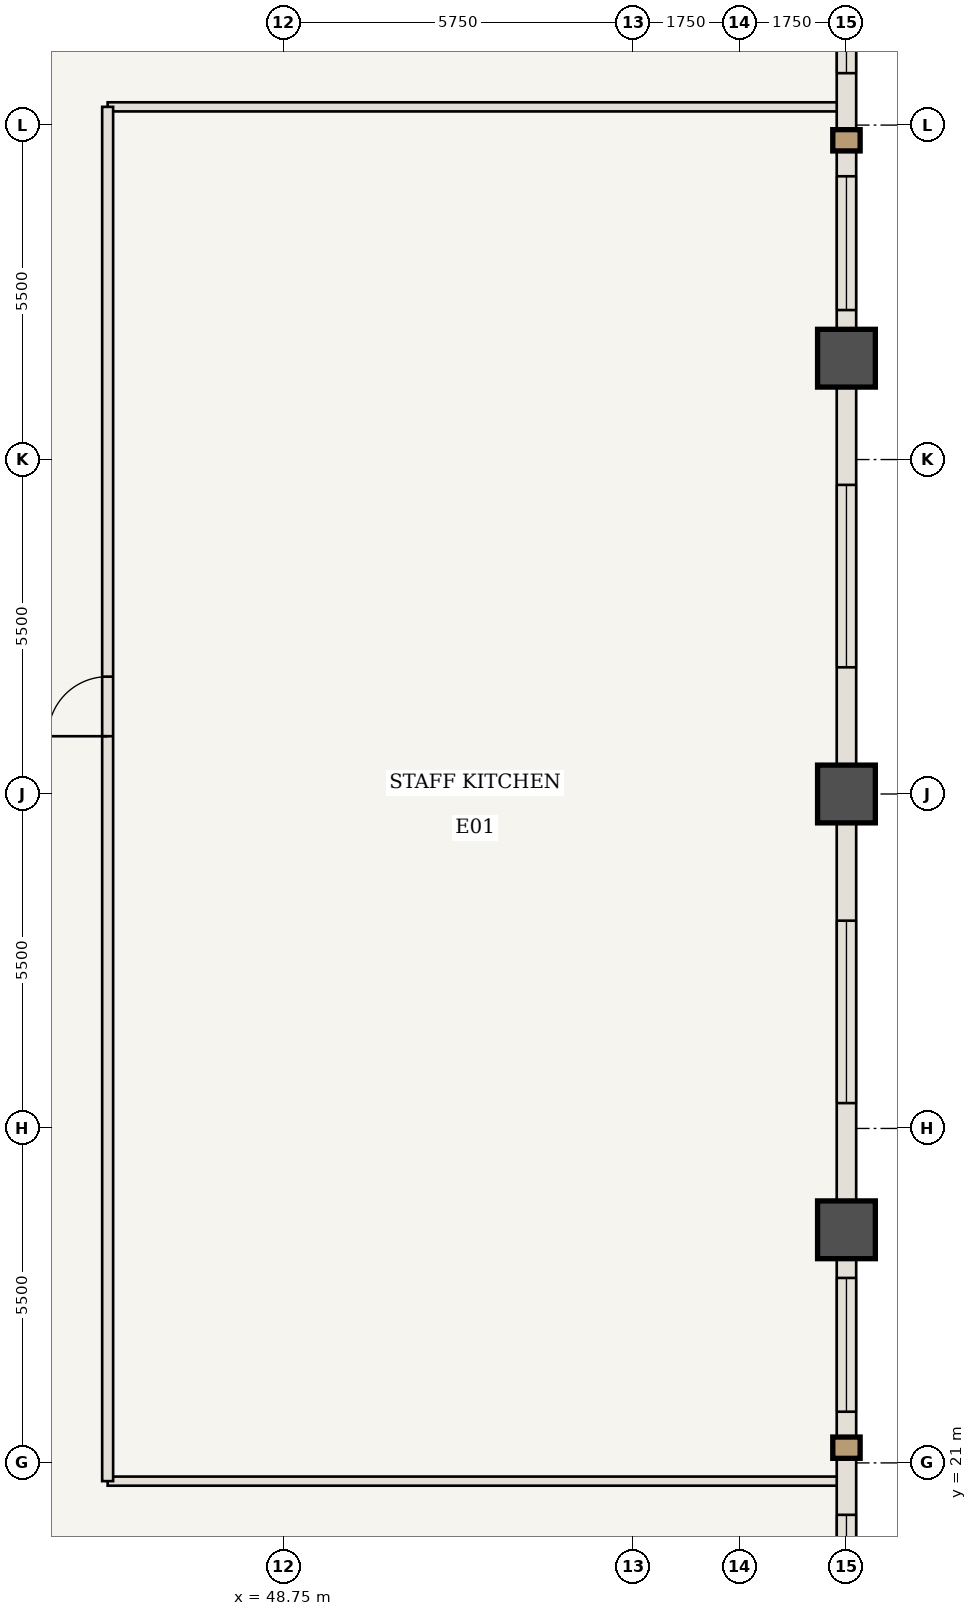
"""IFC4 building model, lengths in metres.
Left out: names, types, materials, properties, quantities, classifications, styles, units other than length and angle.
Written with IfcOpenShell. Run it as: python <this file> out.ifc"""

import sys

from ifc_helpers import new_model, si_unit, direction, frame, frame_2d, origin, origin_2d, place, context, subcontext, project, spatial, rectangle, extrude, element, fill, save


model = new_model("IFC4")
c1 = context("Model", 3, precision=1e-05, world=origin(), true_north=direction((0.0, 1.0)))
c2 = subcontext(c1, "Body", "Model", "MODEL_VIEW")
j1 = project(units=[si_unit("LENGTHUNIT", "METRE"), si_unit("PLANEANGLEUNIT", "RADIAN")], contexts=[c1])
p1 = place(None, origin())
s1 = spatial("IfcSite", under=j1, at=p1, CompositionType="ELEMENT")
p2 = place(p1, origin())
s2 = spatial("IfcBuilding", under=s1, at=p2, CompositionType="ELEMENT")
p3 = place(p2, frame((0.0, 0.0, 168.35)))
s3 = spatial("IfcBuildingStorey", under=s2, at=p3, CompositionType="ELEMENT", Elevation=168.35)
for number, where, z_axis, x_axis in (
    (1, (58.0, 24.833, 0.0), (0.0, 0.0, 1.0), (1.0, 0.0, 0.0)),
    (2, (58.0, 32.0, 0.0), (0.0, 0.0, 1.0), (1.0, 0.0, 0.0)),
    (3, (58.0, 39.167, 0.0), (0.0, 0.0, 1.0), (1.0, 0.0, 0.0)),
):
    element("IfcColumn", number, at=place(p3, frame(where, z_axis=z_axis, x_axis=x_axis)), inside=s3, PredefinedType="COLUMN", context=c2, shape_type="SweptSolid", body=[
        extrude(rectangle(XDim=0.95, YDim=0.95, at=origin_2d()), origin(), (0.0, 0.0, 1.0), 3.85),
    ])
for number, where, z_axis, x_axis in (
    (4, (45.85, 20.7, 0.0), (0.0, 0.0, 1.0), (1.0, 0.0, 0.0)),
    (5, (45.85, 43.3, 0.0), (0.0, 0.0, 1.0), (1.0, 0.0, 0.0)),
):
    element("IfcWall", number, at=place(p3, frame(where, z_axis=z_axis, x_axis=x_axis)), inside=s3, PredefinedType="STANDARD", context=c2, shape_type="SweptSolid", body=[
        extrude(rectangle(XDim=12.09, YDim=0.15, at=frame_2d((6.045, 0.0))), origin(), (0.0, 0.0, 1.0), 3.065),
    ])
p4 = place(p3, frame((45.85, 20.7, 0.0), z_axis=(0.0, 0.0, 1.0), x_axis=(0.0, 1.0, 0.0)))
e6 = element("IfcWall", 6, at=p4, inside=s3, PredefinedType="STANDARD", context=c2, shape_type="SweptSolid", body=[
    extrude(rectangle(XDim=22.6, YDim=0.18, at=frame_2d((11.3, 0.0))), origin(), (0.0, 0.0, 1.0), 3.685),
])
p5 = place(p4, frame((12.25, 0.0, 0.0)))
e7 = element("IfcOpeningElement", 7, at=p5, cuts=e6, PredefinedType="OPENING", context=c2, shape_type="SweptSolid", body=[
    extrude(rectangle(XDim=0.98, YDim=2.2, at=frame_2d((0.49, 1.1))), frame((0.0, 0.1, 0.0), z_axis=(0.0, -1.0, 0.0), x_axis=(1.0, 0.0, 0.0)), (0.0, 0.0, 1.0), 0.2),
])
p6 = place(p3, frame((58.0, 24.833, 0.0), z_axis=(0.0, 0.0, 1.0), x_axis=(0.0, -1.0, 0.0)))
e8 = element("IfcWall", 8, at=p6, inside=s3, PredefinedType="USERDEFINED", context=c2, shape_type="SweptSolid", body=[
    extrude(rectangle(XDim=7.167, YDim=0.32, at=frame_2d((3.583, 0.0))), origin(), (0.0, 0.0, 1.0), 2.885),
])
p7 = place(p6, frame((0.792, 0.0, 0.85)))
e9 = element("IfcOpeningElement", 9, at=p7, cuts=e8, PredefinedType="OPENING", context=c2, shape_type="SweptSolid", body=[
    extrude(rectangle(XDim=2.2, YDim=1.835, at=frame_2d((1.1, 0.917))), frame((0.0, 0.17, 0.0), z_axis=(0.0, -1.0, 0.0), x_axis=(1.0, 0.0, 0.0)), (0.0, 0.0, 1.0), 0.34),
])
p8 = place(p6, frame((4.688, 0.0, 0.85)))
e10 = element("IfcOpeningElement", 10, at=p8, cuts=e8, PredefinedType="OPENING", context=c2, shape_type="SweptSolid", body=[
    extrude(rectangle(XDim=1.6, YDim=1.835, at=frame_2d((0.8, 0.917))), frame((0.0, 0.17, 0.0), z_axis=(0.0, -1.0, 0.0), x_axis=(1.0, 0.0, 0.0)), (0.0, 0.0, 1.0), 0.34),
])
p9 = place(p3, frame((58.0, 32.0, 0.0), z_axis=(0.0, 0.0, 1.0), x_axis=(0.0, -1.0, 0.0)))
e11 = element("IfcWall", 11, at=p9, inside=s3, PredefinedType="USERDEFINED", context=c2, shape_type="SweptSolid", body=[
    extrude(rectangle(XDim=7.167, YDim=0.32, at=frame_2d((3.583, 0.0))), origin(), (0.0, 0.0, 1.0), 2.885),
])
p10 = place(p9, frame((2.083, 0.0, 0.85)))
e12 = element("IfcOpeningElement", 12, at=p10, cuts=e11, PredefinedType="OPENING", context=c2, shape_type="SweptSolid", body=[
    extrude(rectangle(XDim=3.0, YDim=1.835, at=frame_2d((1.5, 0.917))), frame((0.0, 0.17, 0.0), z_axis=(0.0, -1.0, 0.0), x_axis=(1.0, 0.0, 0.0)), (0.0, 0.0, 1.0), 0.34),
])
p11 = place(p3, frame((58.0, 39.167, 0.0), z_axis=(0.0, 0.0, 1.0), x_axis=(0.0, -1.0, 0.0)))
e13 = element("IfcWall", 13, at=p11, inside=s3, PredefinedType="USERDEFINED", context=c2, shape_type="SweptSolid", body=[
    extrude(rectangle(XDim=7.167, YDim=0.32, at=frame_2d((3.583, 0.0))), origin(), (0.0, 0.0, 1.0), 2.885),
])
p12 = place(p11, frame((2.083, 0.0, 0.85)))
e14 = element("IfcOpeningElement", 14, at=p12, cuts=e13, PredefinedType="OPENING", context=c2, shape_type="SweptSolid", body=[
    extrude(rectangle(XDim=3.0, YDim=1.835, at=frame_2d((1.5, 0.917))), frame((0.0, 0.17, 0.0), z_axis=(0.0, -1.0, 0.0), x_axis=(1.0, 0.0, 0.0)), (0.0, 0.0, 1.0), 0.34),
])
p13 = place(p3, frame((58.0, 46.333, 0.0), z_axis=(0.0, 0.0, 1.0), x_axis=(0.0, -1.0, 0.0)))
e15 = element("IfcWall", 15, at=p13, inside=s3, PredefinedType="USERDEFINED", context=c2, shape_type="SweptSolid", body=[
    extrude(rectangle(XDim=7.167, YDim=0.32, at=frame_2d((3.583, 0.0))), origin(), (0.0, 0.0, 1.0), 2.885),
])
p14 = place(p13, frame((0.879, 0.0, 0.85)))
e16 = element("IfcOpeningElement", 16, at=p14, cuts=e15, PredefinedType="OPENING", context=c2, shape_type="SweptSolid", body=[
    extrude(rectangle(XDim=1.6, YDim=1.835, at=frame_2d((0.8, 0.917))), frame((0.0, 0.17, 0.0), z_axis=(0.0, -1.0, 0.0), x_axis=(1.0, 0.0, 0.0)), (0.0, 0.0, 1.0), 0.34),
])
p15 = place(p13, frame((4.175, 0.0, 0.85)))
e17 = element("IfcOpeningElement", 17, at=p15, cuts=e15, PredefinedType="OPENING", context=c2, shape_type="SweptSolid", body=[
    extrude(rectangle(XDim=2.2, YDim=1.835, at=frame_2d((1.1, 0.917))), frame((0.0, 0.17, 0.0), z_axis=(0.0, -1.0, 0.0), x_axis=(1.0, 0.0, 0.0)), (0.0, 0.0, 1.0), 0.34),
])
p16 = place(p5, origin())
e18 = element("IfcDoor", 18, at=p16, inside=s3, OperationType="SINGLE_SWING_LEFT", PredefinedType="DOOR", context=c2, shape_type="SweptSolid", body=[
    extrude(rectangle(XDim=0.98, YDim=2.2, at=frame_2d((0.49, 1.1))), frame((0.0, 0.025, 0.0), z_axis=(0.0, -1.0, 0.0), x_axis=(1.0, 0.0, 0.0)), (0.0, 0.0, 1.0), 0.05),
])
fill(e7, e18)
p17 = place(p7, origin())
e19 = element("IfcWindow", 19, at=p17, inside=s3, PartitioningType="SINGLE_PANEL", PredefinedType="WINDOW", context=c2, shape_type="SweptSolid", body=[
    extrude(rectangle(XDim=2.2, YDim=1.835, at=frame_2d((1.1, 0.917))), frame((0.0, 0.03, 0.0), z_axis=(0.0, -1.0, 0.0), x_axis=(1.0, 0.0, 0.0)), (0.0, 0.0, 1.0), 0.06),
])
fill(e9, e19)
p18 = place(p8, origin())
e20 = element("IfcWindow", 20, at=p18, inside=s3, PartitioningType="SINGLE_PANEL", PredefinedType="WINDOW", context=c2, shape_type="SweptSolid", body=[
    extrude(rectangle(XDim=1.6, YDim=1.835, at=frame_2d((0.8, 0.917))), frame((0.0, 0.03, 0.0), z_axis=(0.0, -1.0, 0.0), x_axis=(1.0, 0.0, 0.0)), (0.0, 0.0, 1.0), 0.06),
])
fill(e10, e20)
p19 = place(p10, origin())
e21 = element("IfcWindow", 21, at=p19, inside=s3, PartitioningType="SINGLE_PANEL", PredefinedType="WINDOW", context=c2, shape_type="SweptSolid", body=[
    extrude(rectangle(XDim=3.0, YDim=1.835, at=frame_2d((1.5, 0.917))), frame((0.0, 0.03, 0.0), z_axis=(0.0, -1.0, 0.0), x_axis=(1.0, 0.0, 0.0)), (0.0, 0.0, 1.0), 0.06),
])
fill(e12, e21)
p20 = place(p12, origin())
e22 = element("IfcWindow", 22, at=p20, inside=s3, PartitioningType="SINGLE_PANEL", PredefinedType="WINDOW", context=c2, shape_type="SweptSolid", body=[
    extrude(rectangle(XDim=3.0, YDim=1.835, at=frame_2d((1.5, 0.917))), frame((0.0, 0.03, 0.0), z_axis=(0.0, -1.0, 0.0), x_axis=(1.0, 0.0, 0.0)), (0.0, 0.0, 1.0), 0.06),
])
fill(e14, e22)
p21 = place(p14, origin())
e23 = element("IfcWindow", 23, at=p21, inside=s3, PartitioningType="SINGLE_PANEL", PredefinedType="WINDOW", context=c2, shape_type="SweptSolid", body=[
    extrude(rectangle(XDim=1.6, YDim=1.835, at=frame_2d((0.8, 0.917))), frame((0.0, 0.03, 0.0), z_axis=(0.0, -1.0, 0.0), x_axis=(1.0, 0.0, 0.0)), (0.0, 0.0, 1.0), 0.06),
])
fill(e16, e23)
p22 = place(p15, origin())
e24 = element("IfcWindow", 24, at=p22, inside=s3, PartitioningType="SINGLE_PANEL", PredefinedType="WINDOW", context=c2, shape_type="SweptSolid", body=[
    extrude(rectangle(XDim=2.2, YDim=1.835, at=frame_2d((1.1, 0.917))), frame((0.0, 0.03, 0.0), z_axis=(0.0, -1.0, 0.0), x_axis=(1.0, 0.0, 0.0)), (0.0, 0.0, 1.0), 0.06),
])
fill(e17, e24)
save(model, sys.argv[1])
